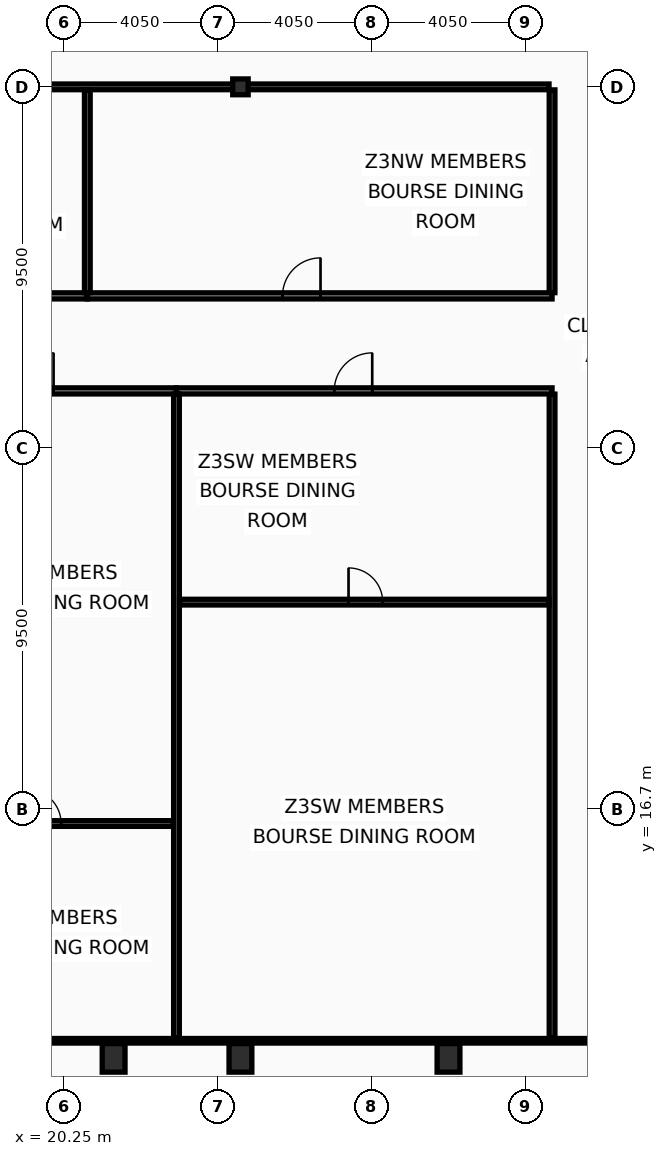
"""IFC4 building model, lengths in metres.
Left out: names, types, materials, properties, quantities, classifications, styles, units other than length and angle.
Written with IfcOpenShell. Run it as: python <this file> out.ifc"""

import sys

from ifc_helpers import new_model, si_unit, direction, frame, frame_2d, origin, origin_2d, place, context, subcontext, project, spatial, rectangle, hollow_rectangle, i_section, extrude, element, fill, save


model = new_model("IFC4")
c1 = context("Model", 3, precision=1e-05, world=origin(), true_north=direction((0.0, 1.0)))
c2 = subcontext(c1, "Body", "Model", "MODEL_VIEW")
j1 = project(units=[si_unit("LENGTHUNIT", "METRE"), si_unit("PLANEANGLEUNIT", "RADIAN")], contexts=[c1])
p1 = place(None, origin())
s1 = spatial("IfcSite", under=j1, at=p1, CompositionType="ELEMENT")
p2 = place(p1, origin())
s2 = spatial("IfcBuilding", under=s1, at=p2, CompositionType="ELEMENT")
p3 = place(p2, frame((0.0, 0.0, 239.0)))
s3 = spatial("IfcBuildingStorey", under=s2, at=p3, CompositionType="ELEMENT", Elevation=239.0)
for number, where, z_axis, x_axis in (
    (1, (21.562, 10.15, 0.0), (0.0, 0.0, 1.0), (1.0, 0.0, 0.0)),
    (2, (24.9, 10.15, 0.0), (0.0, 0.0, 1.0), (1.0, 0.0, 0.0)),
    (3, (30.375, 10.15, 0.0), (0.0, 0.0, 1.0), (1.0, 0.0, 0.0)),
):
    element("IfcColumn", number, at=place(p3, frame(where, z_axis=z_axis, x_axis=x_axis)), inside=s3, PredefinedType="COLUMN", context=c2, shape_type="SweptSolid", body=[
        extrude(hollow_rectangle(XDim=0.6, YDim=0.75, WallThickness=0.045, at=origin_2d()), origin(), (0.0, 0.0, 1.0), 3.6),
    ])
p4 = place(p3, frame((24.9, 35.7, 0.0), z_axis=(0.0, 0.0, 1.0), x_axis=(1.0, 0.0, 0.0)))
e4 = element("IfcColumn", 4, at=p4, inside=s3, PredefinedType="COLUMN", context=c2, shape_type="SweptSolid", body=[
    extrude(i_section(OverallWidth=0.406, OverallDepth=0.416, WebThickness=0.03, FlangeThickness=0.048, at=origin_2d()), origin(), (0.0, 0.0, 1.0), 3.6),
])
p5 = place(p3, frame((33.1, 10.665, 0.0), z_axis=(0.0, 0.0, 1.0), x_axis=(0.0, 1.0, 0.0)))
e5 = element("IfcWall", 5, at=p5, inside=s3, PredefinedType="PARTITIONING", context=c2, shape_type="SweptSolid", body=[
    extrude(rectangle(XDim=16.95, YDim=0.15, at=frame_2d((8.475, 0.0))), origin(), (0.0, 0.0, 1.0), 2.98),
])
p6 = place(p3, frame((33.1, 30.285, 0.0), z_axis=(0.0, 0.0, 1.0), x_axis=(0.0, 1.0, 0.0)))
e6 = element("IfcWall", 6, at=p6, inside=s3, PredefinedType="PARTITIONING", context=c2, shape_type="SweptSolid", body=[
    extrude(rectangle(XDim=5.335, YDim=0.15, at=frame_2d((2.667, 0.0))), origin(), (0.0, 0.0, 1.0), 2.98),
])
p7 = place(p3, frame((10.095, 35.7, 0.0), z_axis=(0.0, 0.0, 1.0), x_axis=(1.0, 0.0, 0.0)))
e7 = element("IfcWall", 7, at=p7, inside=s3, PredefinedType="PARTITIONING", context=c2, shape_type="SweptSolid", body=[
    extrude(rectangle(XDim=22.925, YDim=0.15, at=frame_2d((11.462, 0.0))), origin(), (0.0, 0.0, 1.0), 2.78),
])
p8 = place(p3, frame((15.916, 27.7, 0.0), z_axis=(0.0, 0.0, 1.0), x_axis=(1.0, 0.0, 0.0)))
e8 = element("IfcWall", 8, at=p8, inside=s3, PredefinedType="PARTITIONING", context=c2, shape_type="SweptSolid", body=[
    extrude(rectangle(XDim=7.301, YDim=0.16, at=frame_2d((3.65, 0.0))), origin(), (0.0, 0.0, 1.0), 2.78),
])
p9 = place(p8, frame((3.066, 0.0, 0.0)))
e9 = element("IfcOpeningElement", 9, at=p9, cuts=e8, PredefinedType="OPENING", context=c2, shape_type="SweptSolid", body=[
    extrude(rectangle(XDim=1.0, YDim=2.05, at=frame_2d((0.5, 1.025))), frame((0.0, 0.09, 0.0), z_axis=(0.0, -1.0, 0.0), x_axis=(1.0, 0.0, 0.0)), (0.0, 0.0, 1.0), 0.18),
])
p10 = place(p3, frame((15.996, 16.317, 0.0), z_axis=(0.0, 0.0, 1.0), x_axis=(1.0, 0.0, 0.0)))
e10 = element("IfcWall", 10, at=p10, inside=s3, PredefinedType="PARTITIONING", context=c2, shape_type="SweptSolid", body=[
    extrude(rectangle(XDim=7.141, YDim=0.15, at=frame_2d((3.57, 0.0))), origin(), (0.0, 0.0, 1.0), 2.78),
])
p11 = place(p10, frame((3.285, 0.0, 0.0)))
e11 = element("IfcOpeningElement", 11, at=p11, cuts=e10, PredefinedType="OPENING", context=c2, shape_type="SweptSolid", body=[
    extrude(rectangle(XDim=0.9, YDim=2.05, at=frame_2d((0.45, 1.025))), frame((0.0, 0.085, 0.0), z_axis=(0.0, -1.0, 0.0), x_axis=(1.0, 0.0, 0.0)), (0.0, 0.0, 1.0), 0.17),
])
p12 = place(p3, frame((23.217, 27.7, 0.0), z_axis=(0.0, 0.0, 1.0), x_axis=(1.0, 0.0, 0.0)))
e12 = element("IfcWall", 12, at=p12, inside=s3, PredefinedType="PARTITIONING", context=c2, shape_type="SweptSolid", body=[
    extrude(rectangle(XDim=9.883, YDim=0.16, at=frame_2d((4.942, 0.0))), origin(), (0.0, 0.0, 1.0), 2.78),
])
p13 = place(p12, frame((4.151, 0.0, 0.0)))
e13 = element("IfcOpeningElement", 13, at=p13, cuts=e12, PredefinedType="OPENING", context=c2, shape_type="SweptSolid", body=[
    extrude(rectangle(XDim=1.0, YDim=2.05, at=frame_2d((0.5, 1.025))), frame((0.0, 0.09, 0.0), z_axis=(0.0, -1.0, 0.0), x_axis=(1.0, 0.0, 0.0)), (0.0, 0.0, 1.0), 0.18),
])
p14 = place(p3, frame((23.217, 10.665, 0.0), z_axis=(0.0, 0.0, 1.0), x_axis=(0.0, 1.0, 0.0)))
e14 = element("IfcWall", 14, at=p14, inside=s3, PredefinedType="PARTITIONING", context=c2, shape_type="SweptSolid", body=[
    extrude(rectangle(XDim=16.95, YDim=0.15, at=frame_2d((8.475, 0.0))), origin(), (0.0, 0.0, 1.0), 2.98),
])
p15 = place(p3, frame((23.297, 22.142, 0.0), z_axis=(0.0, 0.0, 1.0), x_axis=(1.0, 0.0, 0.0)))
e15 = element("IfcWall", 15, at=p15, inside=s3, PredefinedType="PARTITIONING", context=c2, shape_type="SweptSolid", body=[
    extrude(rectangle(XDim=9.723, YDim=0.15, at=frame_2d((4.862, 0.0))), origin(), (0.0, 0.0, 1.0), 2.78),
])
p16 = place(p15, frame((4.448, 0.0, 0.0)))
e16 = element("IfcOpeningElement", 16, at=p16, cuts=e15, PredefinedType="OPENING", context=c2, shape_type="SweptSolid", body=[
    extrude(rectangle(XDim=0.9, YDim=2.05, at=frame_2d((0.45, 1.025))), frame((0.0, 0.085, 0.0), z_axis=(0.0, -1.0, 0.0), x_axis=(1.0, 0.0, 0.0)), (0.0, 0.0, 1.0), 0.17),
])
p17 = place(p3, frame((10.03, 30.2, 0.0), z_axis=(0.0, 0.0, 1.0), x_axis=(1.0, 0.0, 0.0)))
e17 = element("IfcWall", 17, at=p17, inside=s3, PredefinedType="PARTITIONING", context=c2, shape_type="SweptSolid", body=[
    extrude(rectangle(XDim=10.841, YDim=0.16, at=frame_2d((5.42, 0.0))), origin(), (0.0, 0.0, 1.0), 2.78),
])
p18 = place(p17, frame((4.553, 0.0, 0.0)))
e18 = element("IfcOpeningElement", 18, at=p18, cuts=e17, PredefinedType="OPENING", context=c2, shape_type="SweptSolid", body=[
    extrude(rectangle(XDim=1.0, YDim=2.05, at=frame_2d((0.5, 1.025))), frame((0.0, 0.09, 0.0), z_axis=(0.0, -1.0, 0.0), x_axis=(1.0, 0.0, 0.0)), (0.0, 0.0, 1.0), 0.18),
])
p19 = place(p3, frame((20.871, 30.2, 0.0), z_axis=(0.0, 0.0, 1.0), x_axis=(1.0, 0.0, 0.0)))
e19 = element("IfcWall", 19, at=p19, inside=s3, PredefinedType="PARTITIONING", context=c2, shape_type="SweptSolid", body=[
    extrude(rectangle(XDim=12.229, YDim=0.16, at=frame_2d((6.115, 0.0))), origin(), (0.0, 0.0, 1.0), 2.78),
])
p20 = place(p19, frame((5.136, 0.0, 0.0)))
e20 = element("IfcOpeningElement", 20, at=p20, cuts=e19, PredefinedType="OPENING", context=c2, shape_type="SweptSolid", body=[
    extrude(rectangle(XDim=1.0, YDim=2.05, at=frame_2d((0.5, 1.025))), frame((0.0, 0.09, 0.0), z_axis=(0.0, -1.0, 0.0), x_axis=(1.0, 0.0, 0.0)), (0.0, 0.0, 1.0), 0.18),
])
p21 = place(p3, frame((20.871, 30.285, 0.0), z_axis=(0.0, 0.0, 1.0), x_axis=(0.0, 1.0, 0.0)))
e21 = element("IfcWall", 21, at=p21, inside=s3, PredefinedType="PARTITIONING", context=c2, shape_type="SweptSolid", body=[
    extrude(rectangle(XDim=5.335, YDim=0.15, at=frame_2d((2.667, 0.0))), origin(), (0.0, 0.0, 1.0), 2.98),
])
p22 = place(p3, frame((10.095, 10.6, 0.0), z_axis=(0.0, 0.0, 1.0), x_axis=(1.0, 0.0, 0.0)))
e22 = element("IfcWall", 22, at=p22, inside=s3, PredefinedType="PARTITIONING", context=c2, shape_type="SweptSolid", body=[
    extrude(rectangle(XDim=52.71, YDim=0.12, at=frame_2d((26.355, 0.0))), origin(), (0.0, 0.0, 1.0), 2.78),
])
p23 = place(p9, origin())
e23 = element("IfcDoor", 23, at=p23, inside=s3, OperationType="SINGLE_SWING_RIGHT", PredefinedType="DOOR", context=c2, shape_type="SweptSolid", body=[
    extrude(rectangle(XDim=1.0, YDim=2.05, at=frame_2d((0.5, 1.025))), frame((0.0, 0.025, 0.0), z_axis=(0.0, -1.0, 0.0), x_axis=(1.0, 0.0, 0.0)), (0.0, 0.0, 1.0), 0.05),
])
fill(e9, e23)
p24 = place(p11, origin())
e24 = element("IfcDoor", 24, at=p24, inside=s3, OperationType="SINGLE_SWING_LEFT", PredefinedType="DOOR", context=c2, shape_type="SweptSolid", body=[
    extrude(rectangle(XDim=0.9, YDim=2.05, at=frame_2d((0.45, 1.025))), frame((0.0, 0.025, 0.0), z_axis=(0.0, -1.0, 0.0), x_axis=(1.0, 0.0, 0.0)), (0.0, 0.0, 1.0), 0.05),
])
fill(e11, e24)
p25 = place(p13, origin())
e25 = element("IfcDoor", 25, at=p25, inside=s3, OperationType="SINGLE_SWING_RIGHT", PredefinedType="DOOR", context=c2, shape_type="SweptSolid", body=[
    extrude(rectangle(XDim=1.0, YDim=2.05, at=frame_2d((0.5, 1.025))), frame((0.0, 0.025, 0.0), z_axis=(0.0, -1.0, 0.0), x_axis=(1.0, 0.0, 0.0)), (0.0, 0.0, 1.0), 0.05),
])
fill(e13, e25)
p26 = place(p16, origin())
e26 = element("IfcDoor", 26, at=p26, inside=s3, OperationType="SINGLE_SWING_LEFT", PredefinedType="DOOR", context=c2, shape_type="SweptSolid", body=[
    extrude(rectangle(XDim=0.9, YDim=2.05, at=frame_2d((0.45, 1.025))), frame((0.0, 0.025, 0.0), z_axis=(0.0, -1.0, 0.0), x_axis=(1.0, 0.0, 0.0)), (0.0, 0.0, 1.0), 0.05),
])
fill(e16, e26)
p27 = place(p20, origin())
e27 = element("IfcDoor", 27, at=p27, inside=s3, OperationType="SINGLE_SWING_RIGHT", PredefinedType="DOOR", context=c2, shape_type="SweptSolid", body=[
    extrude(rectangle(XDim=1.0, YDim=2.05, at=frame_2d((0.5, 1.025))), frame((0.0, 0.025, 0.0), z_axis=(0.0, -1.0, 0.0), x_axis=(1.0, 0.0, 0.0)), (0.0, 0.0, 1.0), 0.05),
])
fill(e20, e27)
save(model, sys.argv[1])
